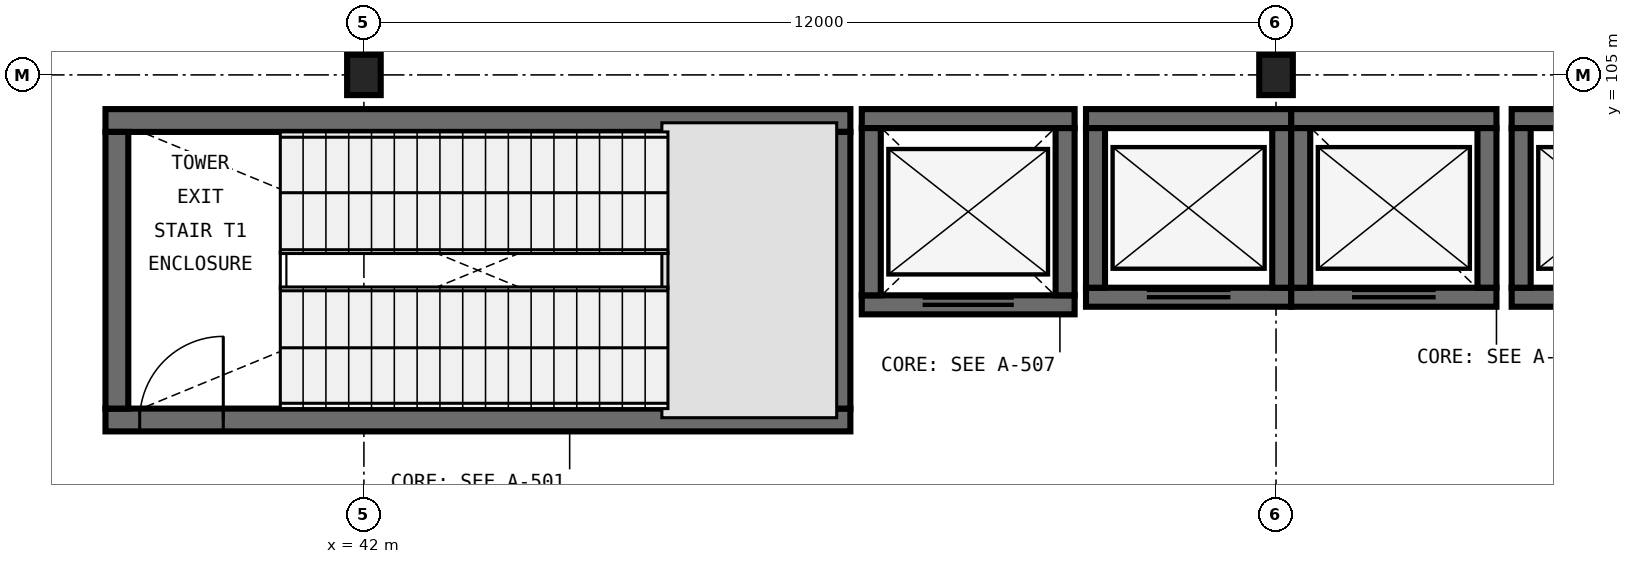
"""IFC4 building model, lengths in metres.
Left out: names, types, materials, properties, quantities, classifications, styles, units other than length and angle.
Written with IfcOpenShell. Run it as: python <this file> out.ifc"""

import sys

from ifc_helpers import new_model, si_unit, direction, frame, frame_2d, origin, origin_2d, place, context, subcontext, project, spatial, rectangle, i_section, extrude, element, fill, save


model = new_model("IFC4")
c1 = context("Model", 3, precision=1e-05, world=origin(), true_north=direction((0.0, 1.0)))
c2 = subcontext(c1, "Body", "Model", "MODEL_VIEW")
j1 = project(units=[si_unit("LENGTHUNIT", "METRE"), si_unit("PLANEANGLEUNIT", "RADIAN")], contexts=[c1])
p1 = place(None, origin())
s1 = spatial("IfcSite", under=j1, at=p1, CompositionType="ELEMENT")
p2 = place(p1, origin())
s2 = spatial("IfcBuilding", under=s1, at=p2, CompositionType="ELEMENT")
p3 = place(p2, frame((0.0, 0.0, 12.0)))
s3 = spatial("IfcBuildingStorey", under=s2, at=p3, CompositionType="ELEMENT", Elevation=12.0)
for number, where, z_axis, x_axis in (
    (1, (42.0, 105.0, 0.0), (0.0, 0.0, 1.0), (1.0, 0.0, 0.0)),
    (2, (54.0, 105.0, 0.0), (0.0, 0.0, 1.0), (1.0, 0.0, 0.0)),
):
    element("IfcColumn", number, at=place(p3, frame(where, z_axis=z_axis, x_axis=x_axis)), inside=s3, PredefinedType="COLUMN", context=c2, shape_type="SweptSolid", body=[
        extrude(i_section(OverallWidth=0.442, OverallDepth=0.531, WebThickness=0.066, FlangeThickness=0.106, FilletRadius=0.031, at=origin_2d()), origin(), (0.0, 0.0, 1.0), 6.0),
    ])
p4 = place(p3, frame((38.6, 100.46, 0.0), z_axis=(0.0, 0.0, 1.0), x_axis=(1.0, 0.0, 0.0)))
e3 = element("IfcWall", 3, at=p4, inside=s3, PredefinedType="SHEAR", context=c2, shape_type="SweptSolid", body=[
    extrude(rectangle(XDim=9.8, YDim=0.3, at=frame_2d((4.9, 0.0))), origin(), (0.0, 0.0, 1.0), 6.0),
])
p5 = place(p4, frame((0.45, 0.0, 0.0)))
e4 = element("IfcOpeningElement", 4, at=p5, cuts=e3, PredefinedType="OPENING", context=c2, shape_type="SweptSolid", body=[
    extrude(rectangle(XDim=1.1, YDim=2.2, at=frame_2d((0.55, 1.1))), frame((0.0, 0.165, 0.0), z_axis=(0.0, -1.0, 0.0), x_axis=(1.0, 0.0, 0.0)), (0.0, 0.0, 1.0), 0.33),
])
p6 = place(p3, frame((48.4, 104.4, 0.0), z_axis=(0.0, 0.0, 1.0), x_axis=(-1.0, 0.0, 0.0)))
e5 = element("IfcWall", 5, at=p6, inside=s3, PredefinedType="SHEAR", context=c2, shape_type="SweptSolid", body=[
    extrude(rectangle(XDim=9.8, YDim=0.3, at=frame_2d((4.9, 0.0))), origin(), (0.0, 0.0, 1.0), 6.0),
])
for number, where, z_axis, x_axis in (
    (6, (38.75, 104.25, 0.0), (0.0, 0.0, 1.0), (0.0, -1.0, 0.0)),
    (7, (48.25, 100.61, 0.0), (0.0, 0.0, 1.0), (0.0, 1.0, 0.0)),
):
    element("IfcWall", number, at=place(p3, frame(where, z_axis=z_axis, x_axis=x_axis)), inside=s3, PredefinedType="SHEAR", context=c2, shape_type="SweptSolid", body=[
        extrude(rectangle(XDim=3.64, YDim=0.3, at=frame_2d((1.82, 0.0))), origin(), (0.0, 0.0, 1.0), 6.0),
    ])
p7 = place(p3, frame((48.55, 101.975, 0.0), z_axis=(0.0, 0.0, 1.0), x_axis=(1.0, 0.0, 0.0)))
e8 = element("IfcWall", 8, at=p7, inside=s3, PredefinedType="SHEAR", context=c2, shape_type="SweptSolid", body=[
    extrude(rectangle(XDim=2.8, YDim=0.25, at=frame_2d((1.4, 0.0))), origin(), (0.0, 0.0, 1.0), 6.0),
])
p8 = place(p7, frame((0.8, 0.0, 0.0)))
e9 = element("IfcOpeningElement", 9, at=p8, cuts=e8, PredefinedType="OPENING", context=c2, shape_type="SweptSolid", body=[
    extrude(rectangle(XDim=1.2, YDim=2.2, at=frame_2d((0.6, 1.1))), frame((0.0, 0.14, 0.0), z_axis=(0.0, -1.0, 0.0), x_axis=(1.0, 0.0, 0.0)), (0.0, 0.0, 1.0), 0.28),
])
p9 = place(p3, frame((51.35, 104.425, 0.0), z_axis=(0.0, 0.0, 1.0), x_axis=(-1.0, 0.0, 0.0)))
e10 = element("IfcWall", 10, at=p9, inside=s3, PredefinedType="SHEAR", context=c2, shape_type="SweptSolid", body=[
    extrude(rectangle(XDim=2.8, YDim=0.25, at=frame_2d((1.4, 0.0))), origin(), (0.0, 0.0, 1.0), 6.0),
])
for number, where, z_axis, x_axis in (
    (11, (48.675, 104.3, 0.0), (0.0, 0.0, 1.0), (0.0, -1.0, 0.0)),
    (12, (51.225, 102.1, 0.0), (0.0, 0.0, 1.0), (0.0, 1.0, 0.0)),
):
    element("IfcWall", number, at=place(p3, frame(where, z_axis=z_axis, x_axis=x_axis)), inside=s3, PredefinedType="SHEAR", context=c2, shape_type="SweptSolid", body=[
        extrude(rectangle(XDim=2.2, YDim=0.25, at=frame_2d((1.1, 0.0))), origin(), (0.0, 0.0, 1.0), 6.0),
    ])
p10 = place(p3, frame((51.5, 102.075, 0.0), z_axis=(0.0, 0.0, 1.0), x_axis=(1.0, 0.0, 0.0)))
e13 = element("IfcWall", 13, at=p10, inside=s3, PredefinedType="SHEAR", context=c2, shape_type="SweptSolid", body=[
    extrude(rectangle(XDim=2.7, YDim=0.25, at=frame_2d((1.35, 0.0))), origin(), (0.0, 0.0, 1.0), 6.0),
])
p11 = place(p10, frame((0.8, 0.0, 0.0)))
e14 = element("IfcOpeningElement", 14, at=p11, cuts=e13, PredefinedType="OPENING", context=c2, shape_type="SweptSolid", body=[
    extrude(rectangle(XDim=1.1, YDim=2.2, at=frame_2d((0.55, 1.1))), frame((0.0, 0.14, 0.0), z_axis=(0.0, -1.0, 0.0), x_axis=(1.0, 0.0, 0.0)), (0.0, 0.0, 1.0), 0.28),
])
p12 = place(p3, frame((54.2, 104.425, 0.0), z_axis=(0.0, 0.0, 1.0), x_axis=(-1.0, 0.0, 0.0)))
e15 = element("IfcWall", 15, at=p12, inside=s3, PredefinedType="SHEAR", context=c2, shape_type="SweptSolid", body=[
    extrude(rectangle(XDim=2.7, YDim=0.25, at=frame_2d((1.35, 0.0))), origin(), (0.0, 0.0, 1.0), 6.0),
])
for number, where, z_axis, x_axis in (
    (16, (51.625, 104.3, 0.0), (0.0, 0.0, 1.0), (0.0, -1.0, 0.0)),
    (17, (54.075, 102.2, 0.0), (0.0, 0.0, 1.0), (0.0, 1.0, 0.0)),
):
    element("IfcWall", number, at=place(p3, frame(where, z_axis=z_axis, x_axis=x_axis)), inside=s3, PredefinedType="SHEAR", context=c2, shape_type="SweptSolid", body=[
        extrude(rectangle(XDim=2.1, YDim=0.25, at=frame_2d((1.05, 0.0))), origin(), (0.0, 0.0, 1.0), 6.0),
    ])
p13 = place(p3, frame((54.2, 102.075, 0.0), z_axis=(0.0, 0.0, 1.0), x_axis=(1.0, 0.0, 0.0)))
e18 = element("IfcWall", 18, at=p13, inside=s3, PredefinedType="SHEAR", context=c2, shape_type="SweptSolid", body=[
    extrude(rectangle(XDim=2.7, YDim=0.25, at=frame_2d((1.35, 0.0))), origin(), (0.0, 0.0, 1.0), 6.0),
])
p14 = place(p13, frame((0.8, 0.0, 0.0)))
e19 = element("IfcOpeningElement", 19, at=p14, cuts=e18, PredefinedType="OPENING", context=c2, shape_type="SweptSolid", body=[
    extrude(rectangle(XDim=1.1, YDim=2.2, at=frame_2d((0.55, 1.1))), frame((0.0, 0.14, 0.0), z_axis=(0.0, -1.0, 0.0), x_axis=(1.0, 0.0, 0.0)), (0.0, 0.0, 1.0), 0.28),
])
p15 = place(p3, frame((56.9, 104.425, 0.0), z_axis=(0.0, 0.0, 1.0), x_axis=(-1.0, 0.0, 0.0)))
e20 = element("IfcWall", 20, at=p15, inside=s3, PredefinedType="SHEAR", context=c2, shape_type="SweptSolid", body=[
    extrude(rectangle(XDim=2.7, YDim=0.25, at=frame_2d((1.35, 0.0))), origin(), (0.0, 0.0, 1.0), 6.0),
])
for number, where, z_axis, x_axis in (
    (21, (54.325, 104.3, 0.0), (0.0, 0.0, 1.0), (0.0, -1.0, 0.0)),
    (22, (56.775, 102.2, 0.0), (0.0, 0.0, 1.0), (0.0, 1.0, 0.0)),
):
    element("IfcWall", number, at=place(p3, frame(where, z_axis=z_axis, x_axis=x_axis)), inside=s3, PredefinedType="SHEAR", context=c2, shape_type="SweptSolid", body=[
        extrude(rectangle(XDim=2.1, YDim=0.25, at=frame_2d((1.05, 0.0))), origin(), (0.0, 0.0, 1.0), 6.0),
    ])
p16 = place(p3, frame((57.1, 102.075, 0.0), z_axis=(0.0, 0.0, 1.0), x_axis=(1.0, 0.0, 0.0)))
e23 = element("IfcWall", 23, at=p16, inside=s3, PredefinedType="SHEAR", context=c2, shape_type="SweptSolid", body=[
    extrude(rectangle(XDim=2.7, YDim=0.25, at=frame_2d((1.35, 0.0))), origin(), (0.0, 0.0, 1.0), 6.0),
])
p17 = place(p16, frame((0.8, 0.0, 0.0)))
e24 = element("IfcOpeningElement", 24, at=p17, cuts=e23, PredefinedType="OPENING", context=c2, shape_type="SweptSolid", body=[
    extrude(rectangle(XDim=1.1, YDim=2.2, at=frame_2d((0.55, 1.1))), frame((0.0, 0.14, 0.0), z_axis=(0.0, -1.0, 0.0), x_axis=(1.0, 0.0, 0.0)), (0.0, 0.0, 1.0), 0.28),
])
p18 = place(p3, frame((59.8, 104.425, 0.0), z_axis=(0.0, 0.0, 1.0), x_axis=(-1.0, 0.0, 0.0)))
e25 = element("IfcWall", 25, at=p18, inside=s3, PredefinedType="SHEAR", context=c2, shape_type="SweptSolid", body=[
    extrude(rectangle(XDim=2.7, YDim=0.25, at=frame_2d((1.35, 0.0))), origin(), (0.0, 0.0, 1.0), 6.0),
])
p19 = place(p3, frame((57.225, 104.3, 0.0), z_axis=(0.0, 0.0, 1.0), x_axis=(0.0, -1.0, 0.0)))
e26 = element("IfcWall", 26, at=p19, inside=s3, PredefinedType="SHEAR", context=c2, shape_type="SweptSolid", body=[
    extrude(rectangle(XDim=2.1, YDim=0.25, at=frame_2d((1.05, 0.0))), origin(), (0.0, 0.0, 1.0), 6.0),
])
p20 = place(p5, origin())
e27 = element("IfcDoor", 27, at=p20, inside=s3, OperationType="SINGLE_SWING_RIGHT", PredefinedType="DOOR", context=c2, shape_type="SweptSolid", body=[
    extrude(rectangle(XDim=1.1, YDim=2.2, at=frame_2d((0.55, 1.1))), frame((0.0, 0.025, 0.0), z_axis=(0.0, -1.0, 0.0), x_axis=(1.0, 0.0, 0.0)), (0.0, 0.0, 1.0), 0.05),
])
fill(e4, e27)
p21 = place(p8, origin())
e28 = element("IfcDoor", 28, at=p21, inside=s3, OperationType="DOUBLE_DOOR_SLIDING", PredefinedType="DOOR", context=c2, shape_type="SweptSolid", body=[
    extrude(rectangle(XDim=1.2, YDim=2.2, at=frame_2d((0.6, 1.1))), frame((0.0, 0.025, 0.0), z_axis=(0.0, -1.0, 0.0), x_axis=(1.0, 0.0, 0.0)), (0.0, 0.0, 1.0), 0.05),
])
fill(e9, e28)
p22 = place(p11, origin())
e29 = element("IfcDoor", 29, at=p22, inside=s3, OperationType="DOUBLE_DOOR_SLIDING", PredefinedType="DOOR", context=c2, shape_type="SweptSolid", body=[
    extrude(rectangle(XDim=1.1, YDim=2.2, at=frame_2d((0.55, 1.1))), frame((0.0, 0.025, 0.0), z_axis=(0.0, -1.0, 0.0), x_axis=(1.0, 0.0, 0.0)), (0.0, 0.0, 1.0), 0.05),
])
fill(e14, e29)
p23 = place(p14, origin())
e30 = element("IfcDoor", 30, at=p23, inside=s3, OperationType="DOUBLE_DOOR_SLIDING", PredefinedType="DOOR", context=c2, shape_type="SweptSolid", body=[
    extrude(rectangle(XDim=1.1, YDim=2.2, at=frame_2d((0.55, 1.1))), frame((0.0, 0.025, 0.0), z_axis=(0.0, -1.0, 0.0), x_axis=(1.0, 0.0, 0.0)), (0.0, 0.0, 1.0), 0.05),
])
fill(e19, e30)
save(model, sys.argv[1])
